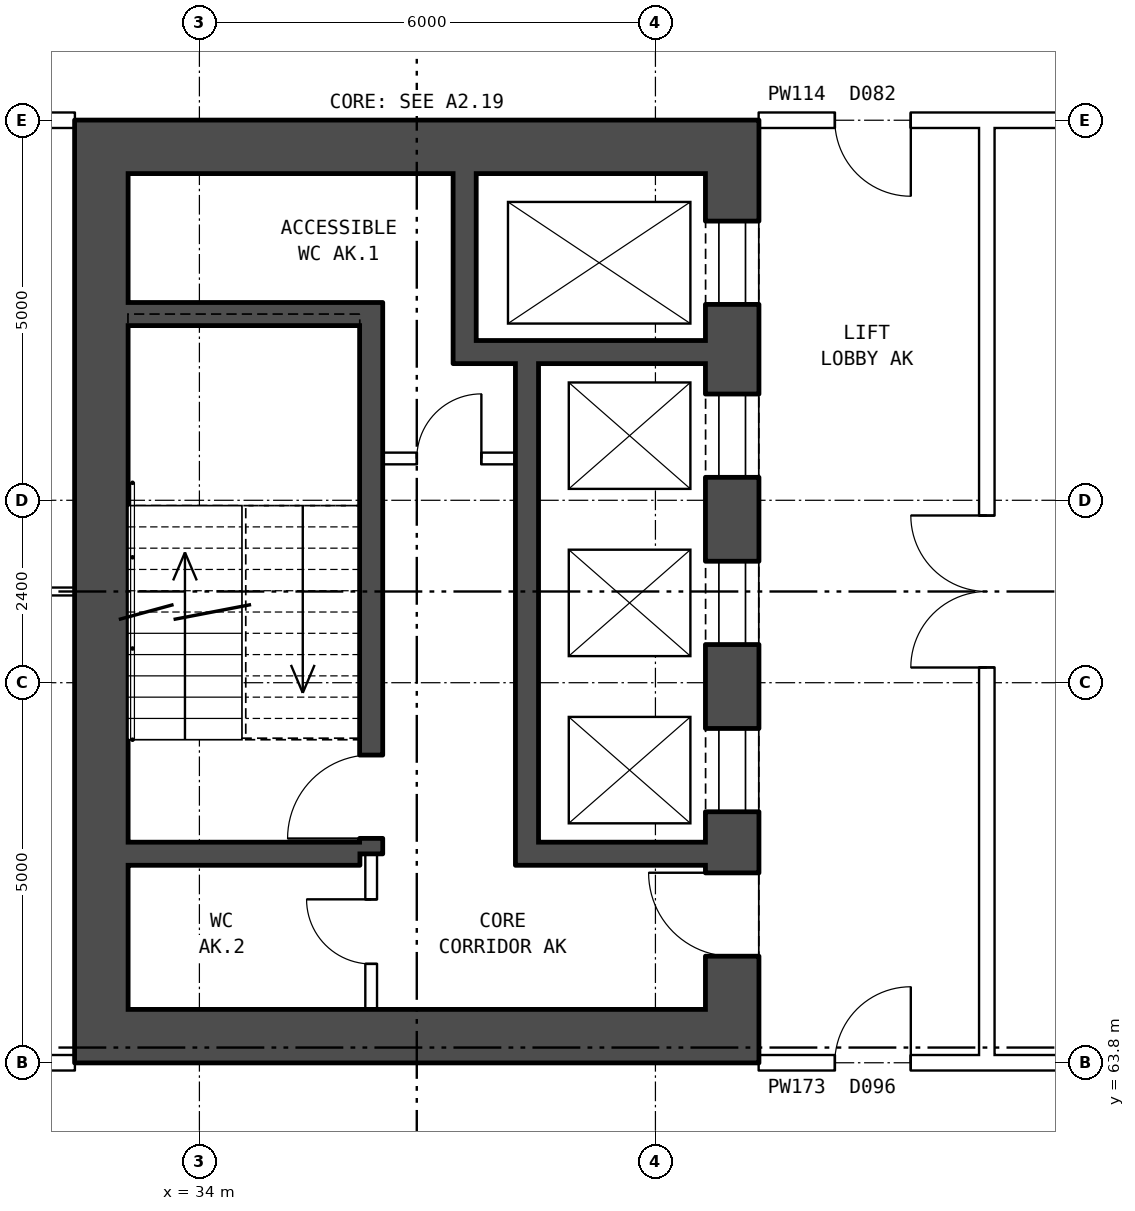
"""IFC4 building model, lengths in metres.
Left out: names, types, materials, properties, quantities, classifications, styles, units other than length and angle.
Written with IfcOpenShell. Run it as: python <this file> out.ifc"""

import sys

from ifc_helpers import new_model, si_unit, direction, frame, frame_2d, origin, place, context, subcontext, project, spatial, rectangle, extrude, element, fill, save


model = new_model("IFC4")
c1 = context("Model", 3, precision=1e-05, world=origin(), true_north=direction((0.0, 1.0)))
c2 = subcontext(c1, "Body", "Model", "MODEL_VIEW")
j1 = project(units=[si_unit("LENGTHUNIT", "METRE"), si_unit("PLANEANGLEUNIT", "RADIAN")], contexts=[c1])
p1 = place(None, origin())
s1 = spatial("IfcSite", under=j1, at=p1, CompositionType="ELEMENT")
p2 = place(p1, origin())
s2 = spatial("IfcBuilding", under=s1, at=p2, CompositionType="ELEMENT")
p3 = place(p2, frame((0.0, 0.0, 67.4)))
s3 = spatial("IfcBuildingStorey", under=s2, at=p3, CompositionType="ELEMENT", Elevation=67.4)
p4 = place(p3, frame((41.01, 75.5, 0.0), z_axis=(0.0, 0.0, 1.0), x_axis=(0.0, -1.0, 0.0)))
e1 = element("IfcWall", 1, at=p4, inside=s3, PredefinedType="SHEAR", context=c2, shape_type="SweptSolid", body=[
    extrude(rectangle(XDim=11.0, YDim=0.7, at=frame_2d((5.5, 0.0))), origin(), (0.0, 0.0, 1.0), 3.6),
])
p5 = place(p4, frame((0.625, 0.0, 0.0)))
e2 = element("IfcOpeningElement", 2, at=p5, cuts=e1, PredefinedType="OPENING", context=c2, shape_type="SweptSolid", body=[
    extrude(rectangle(XDim=1.1, YDim=2.1, at=frame_2d((0.55, 1.05))), frame((0.0, 0.36, 0.0), z_axis=(0.0, -1.0, 0.0), x_axis=(1.0, 0.0, 0.0)), (0.0, 0.0, 1.0), 0.72),
])
p6 = place(p4, frame((2.9, 0.0, 0.0)))
e3 = element("IfcOpeningElement", 3, at=p6, cuts=e1, PredefinedType="OPENING", context=c2, shape_type="SweptSolid", body=[
    extrude(rectangle(XDim=1.1, YDim=2.1, at=frame_2d((0.55, 1.05))), frame((0.0, 0.36, 0.0), z_axis=(0.0, -1.0, 0.0), x_axis=(1.0, 0.0, 0.0)), (0.0, 0.0, 1.0), 0.72),
])
p7 = place(p4, frame((5.1, 0.0, 0.0)))
e4 = element("IfcOpeningElement", 4, at=p7, cuts=e1, PredefinedType="OPENING", context=c2, shape_type="SweptSolid", body=[
    extrude(rectangle(XDim=1.1, YDim=2.1, at=frame_2d((0.55, 1.05))), frame((0.0, 0.36, 0.0), z_axis=(0.0, -1.0, 0.0), x_axis=(1.0, 0.0, 0.0)), (0.0, 0.0, 1.0), 0.72),
])
p8 = place(p4, frame((7.3, 0.0, 0.0)))
e5 = element("IfcOpeningElement", 5, at=p8, cuts=e1, PredefinedType="OPENING", context=c2, shape_type="SweptSolid", body=[
    extrude(rectangle(XDim=1.1, YDim=2.1, at=frame_2d((0.55, 1.05))), frame((0.0, 0.36, 0.0), z_axis=(0.0, -1.0, 0.0), x_axis=(1.0, 0.0, 0.0)), (0.0, 0.0, 1.0), 0.72),
])
p9 = place(p4, frame((9.2, 0.0, 0.0)))
e6 = element("IfcOpeningElement", 6, at=p9, cuts=e1, PredefinedType="OPENING", context=c2, shape_type="SweptSolid", body=[
    extrude(rectangle(XDim=1.1, YDim=2.1, at=frame_2d((0.55, 1.05))), frame((0.0, 0.36, 0.0), z_axis=(0.0, -1.0, 0.0), x_axis=(1.0, 0.0, 0.0)), (0.0, 0.0, 1.0), 0.72),
])
p10 = place(p3, frame((32.71, 75.5, 0.0), z_axis=(0.0, 0.0, 1.0), x_axis=(0.0, -1.0, 0.0)))
e7 = element("IfcWall", 7, at=p10, inside=s3, PredefinedType="SHEAR", context=c2, shape_type="SweptSolid", body=[
    extrude(rectangle(XDim=11.0, YDim=0.7, at=frame_2d((5.5, 0.0))), origin(), (0.0, 0.0, 1.0), 3.6),
])
for number, where, z_axis, x_axis in (
    (8, (41.36, 75.85, 0.0), (0.0, 0.0, 1.0), (-1.0, 0.0, 0.0)),
    (9, (41.36, 64.15, 0.0), (0.0, 0.0, 1.0), (-1.0, 0.0, 0.0)),
):
    element("IfcWall", number, at=place(p3, frame(where, z_axis=z_axis, x_axis=x_axis)), inside=s3, PredefinedType="SHEAR", context=c2, shape_type="SweptSolid", body=[
        extrude(rectangle(XDim=9.0, YDim=0.7, at=frame_2d((4.5, 0.0))), origin(), (0.0, 0.0, 1.0), 3.6),
    ])
p11 = place(p3, frame((36.11, 73.65, 0.0), z_axis=(0.0, 0.0, 1.0), x_axis=(-1.0, 0.0, 0.0)))
e10 = element("IfcWall", 10, at=p11, inside=s3, PredefinedType="SHEAR", context=c2, shape_type="SweptSolid", body=[
    extrude(rectangle(XDim=3.05, YDim=0.3, at=frame_2d((1.525, 0.0))), origin(), (0.0, 0.0, 1.0), 3.6),
])
p12 = place(p3, frame((40.66, 73.15, 0.0), z_axis=(0.0, 0.0, 1.0), x_axis=(-1.0, 0.0, 0.0)))
e11 = element("IfcWall", 11, at=p12, inside=s3, PredefinedType="SHEAR", context=c2, shape_type="SweptSolid", body=[
    extrude(rectangle(XDim=3.32, YDim=0.3, at=frame_2d((1.66, 0.0))), origin(), (0.0, 0.0, 1.0), 3.6),
])
p13 = place(p3, frame((38.16, 71.75, 0.0), z_axis=(0.0, 0.0, 1.0), x_axis=(-1.0, 0.0, 0.0)))
e12 = element("IfcWall", 12, at=p13, inside=s3, PredefinedType="PARTITIONING", context=c2, shape_type="SweptSolid", body=[
    extrude(rectangle(XDim=1.75, YDim=0.15, at=frame_2d((0.875, 0.0))), origin(), (0.0, 0.0, 1.0), 3.6),
])
p14 = place(p13, frame((0.45, 0.0, 0.0)))
e13 = element("IfcOpeningElement", 13, at=p14, cuts=e12, PredefinedType="OPENING", context=c2, shape_type="SweptSolid", body=[
    extrude(rectangle(XDim=0.85, YDim=2.1, at=frame_2d((0.425, 1.05))), frame((0.0, 0.085, 0.0), z_axis=(0.0, -1.0, 0.0), x_axis=(1.0, 0.0, 0.0)), (0.0, 0.0, 1.0), 0.17),
])
p15 = place(p3, frame((40.66, 66.55, 0.0), z_axis=(0.0, 0.0, 1.0), x_axis=(-1.0, 0.0, 0.0)))
e14 = element("IfcWall", 14, at=p15, inside=s3, PredefinedType="SHEAR", context=c2, shape_type="SweptSolid", body=[
    extrude(rectangle(XDim=2.2, YDim=0.3, at=frame_2d((1.1, 0.0))), origin(), (0.0, 0.0, 1.0), 3.6),
])
p16 = place(p3, frame((36.11, 66.55, 0.0), z_axis=(0.0, 0.0, 1.0), x_axis=(-1.0, 0.0, 0.0)))
e15 = element("IfcWall", 15, at=p16, inside=s3, PredefinedType="SHEAR", context=c2, shape_type="SweptSolid", body=[
    extrude(rectangle(XDim=3.05, YDim=0.3, at=frame_2d((1.525, 0.0))), origin(), (0.0, 0.0, 1.0), 3.6),
])
p17 = place(p3, frame((38.31, 73.0, 0.0), z_axis=(0.0, 0.0, 1.0), x_axis=(0.0, -1.0, 0.0)))
e16 = element("IfcWall", 16, at=p17, inside=s3, PredefinedType="SHEAR", context=c2, shape_type="SweptSolid", body=[
    extrude(rectangle(XDim=6.6, YDim=0.3, at=frame_2d((3.3, 0.0))), origin(), (0.0, 0.0, 1.0), 3.6),
])
p18 = place(p3, frame((37.49, 75.5, 0.0), z_axis=(0.0, 0.0, 1.0), x_axis=(0.0, -1.0, 0.0)))
e17 = element("IfcWall", 17, at=p18, inside=s3, PredefinedType="SHEAR", context=c2, shape_type="SweptSolid", body=[
    extrude(rectangle(XDim=2.2, YDim=0.3, at=frame_2d((1.1, 0.0))), origin(), (0.0, 0.0, 1.0), 3.6),
])
p19 = place(p3, frame((36.26, 73.8, 0.0), z_axis=(0.0, 0.0, 1.0), x_axis=(0.0, -1.0, 0.0)))
e18 = element("IfcWall", 18, at=p19, inside=s3, PredefinedType="SHEAR", context=c2, shape_type="SweptSolid", body=[
    extrude(rectangle(XDim=7.25, YDim=0.3, at=frame_2d((3.625, 0.0))), origin(), (0.0, 0.0, 1.0), 3.6),
])
p20 = place(p19, frame((5.95, 0.0, 0.0)))
e19 = element("IfcOpeningElement", 19, at=p20, cuts=e18, PredefinedType="OPENING", context=c2, shape_type="SweptSolid", body=[
    extrude(rectangle(XDim=1.1, YDim=2.1, at=frame_2d((0.55, 1.05))), frame((0.0, 0.16, 0.0), z_axis=(0.0, -1.0, 0.0), x_axis=(1.0, 0.0, 0.0)), (0.0, 0.0, 1.0), 0.32),
])
p21 = place(p3, frame((36.26, 66.55, 0.0), z_axis=(0.0, 0.0, 1.0), x_axis=(0.0, -1.0, 0.0)))
e20 = element("IfcWall", 20, at=p21, inside=s3, PredefinedType="PARTITIONING", context=c2, shape_type="SweptSolid", body=[
    extrude(rectangle(XDim=2.05, YDim=0.15, at=frame_2d((1.025, 0.0))), origin(), (0.0, 0.0, 1.0), 3.6),
])
p22 = place(p21, frame((0.6, 0.0, 0.0)))
e21 = element("IfcOpeningElement", 21, at=p22, cuts=e20, PredefinedType="OPENING", context=c2, shape_type="SweptSolid", body=[
    extrude(rectangle(XDim=0.85, YDim=2.1, at=frame_2d((0.425, 1.05))), frame((0.0, 0.085, 0.0), z_axis=(0.0, -1.0, 0.0), x_axis=(1.0, 0.0, 0.0)), (0.0, 0.0, 1.0), 0.17),
])
p23 = place(p3, frame((44.36, 63.9, 0.0), z_axis=(0.0, 0.0, 1.0), x_axis=(0.0, 1.0, 0.0)))
e22 = element("IfcWall", 22, at=p23, inside=s3, PredefinedType="PARTITIONING", context=c2, shape_type="SweptSolid", body=[
    extrude(rectangle(XDim=12.2, YDim=0.2, at=frame_2d((6.1, 0.0))), origin(), (0.0, 0.0, 1.0), 3.6),
])
p24 = place(p23, frame((5.1, 0.0, 0.0)))
e23 = element("IfcOpeningElement", 23, at=p24, cuts=e22, PredefinedType="OPENING", context=c2, shape_type="SweptSolid", body=[
    extrude(rectangle(XDim=2.0, YDim=2.1, at=frame_2d((1.0, 1.05))), frame((0.0, 0.11, 0.0), z_axis=(0.0, -1.0, 0.0), x_axis=(1.0, 0.0, 0.0)), (0.0, 0.0, 1.0), 0.22),
])
p25 = place(p3, frame((23.49, 63.8, 0.0), z_axis=(0.0, 0.0, 1.0), x_axis=(1.0, 0.0, 0.0)))
e24 = element("IfcWall", 24, at=p25, inside=s3, PredefinedType="PARTITIONING", context=c2, shape_type="SweptSolid", body=[
    extrude(rectangle(XDim=8.87, YDim=0.2, at=frame_2d((4.435, 0.0))), origin(), (0.0, 0.0, 1.0), 3.6),
])
p26 = place(p25, frame((3.995, 0.0, 0.0)))
e25 = element("IfcOpeningElement", 25, at=p26, cuts=e24, PredefinedType="OPENING", context=c2, shape_type="SweptSolid", body=[
    extrude(rectangle(XDim=1.0, YDim=2.1, at=frame_2d((0.5, 1.05))), frame((0.0, 0.11, 0.0), z_axis=(0.0, -1.0, 0.0), x_axis=(1.0, 0.0, 0.0)), (0.0, 0.0, 1.0), 0.22),
])
p27 = place(p3, frame((44.36, 63.8, 0.0), z_axis=(0.0, 0.0, 1.0), x_axis=(1.0, 0.0, 0.0)))
e26 = element("IfcWall", 26, at=p27, inside=s3, PredefinedType="PARTITIONING", context=c2, shape_type="SweptSolid", body=[
    extrude(rectangle(XDim=19.28, YDim=0.2, at=frame_2d((9.64, 0.0))), origin(), (0.0, 0.0, 1.0), 3.6),
])
p28 = place(p27, frame((8.74, 0.0, 0.0)))
e27 = element("IfcOpeningElement", 27, at=p28, cuts=e26, PredefinedType="OPENING", context=c2, shape_type="SweptSolid", body=[
    extrude(rectangle(XDim=1.8, YDim=2.1, at=frame_2d((0.9, 1.05))), frame((0.0, 0.11, 0.0), z_axis=(0.0, -1.0, 0.0), x_axis=(1.0, 0.0, 0.0)), (0.0, 0.0, 1.0), 0.22),
])
p29 = place(p3, frame((41.36, 63.8, 0.0), z_axis=(0.0, 0.0, 1.0), x_axis=(1.0, 0.0, 0.0)))
e28 = element("IfcWall", 28, at=p29, inside=s3, PredefinedType="PARTITIONING", context=c2, shape_type="SweptSolid", body=[
    extrude(rectangle(XDim=3.0, YDim=0.2, at=frame_2d((1.5, 0.0))), origin(), (0.0, 0.0, 1.0), 3.6),
])
p30 = place(p29, frame((1.0, 0.0, 0.0)))
e29 = element("IfcOpeningElement", 29, at=p30, cuts=e28, PredefinedType="OPENING", context=c2, shape_type="SweptSolid", body=[
    extrude(rectangle(XDim=1.0, YDim=2.1, at=frame_2d((0.5, 1.05))), frame((0.0, 0.11, 0.0), z_axis=(0.0, -1.0, 0.0), x_axis=(1.0, 0.0, 0.0)), (0.0, 0.0, 1.0), 0.22),
])
p31 = place(p3, frame((23.49, 70.0, 0.0), z_axis=(0.0, 0.0, 1.0), x_axis=(1.0, 0.0, 0.0)))
e30 = element("IfcWall", 30, at=p31, inside=s3, PredefinedType="PARTITIONING", context=c2, shape_type="SweptSolid", body=[
    extrude(rectangle(XDim=8.87, YDim=0.1, at=frame_2d((4.435, 0.0))), origin(), (0.0, 0.0, 1.0), 3.6),
])
p32 = place(p3, frame((23.49, 76.2, 0.0), z_axis=(0.0, 0.0, 1.0), x_axis=(1.0, 0.0, 0.0)))
e31 = element("IfcWall", 31, at=p32, inside=s3, PredefinedType="PARTITIONING", context=c2, shape_type="SweptSolid", body=[
    extrude(rectangle(XDim=8.87, YDim=0.2, at=frame_2d((4.435, 0.0))), origin(), (0.0, 0.0, 1.0), 3.6),
])
p33 = place(p32, frame((3.995, 0.0, 0.0)))
e32 = element("IfcOpeningElement", 32, at=p33, cuts=e31, PredefinedType="OPENING", context=c2, shape_type="SweptSolid", body=[
    extrude(rectangle(XDim=1.0, YDim=2.1, at=frame_2d((0.5, 1.05))), frame((0.0, 0.11, 0.0), z_axis=(0.0, -1.0, 0.0), x_axis=(1.0, 0.0, 0.0)), (0.0, 0.0, 1.0), 0.22),
])
p34 = place(p3, frame((44.36, 76.2, 0.0), z_axis=(0.0, 0.0, 1.0), x_axis=(1.0, 0.0, 0.0)))
e33 = element("IfcWall", 33, at=p34, inside=s3, PredefinedType="PARTITIONING", context=c2, shape_type="SweptSolid", body=[
    extrude(rectangle(XDim=19.28, YDim=0.2, at=frame_2d((9.64, 0.0))), origin(), (0.0, 0.0, 1.0), 3.6),
])
p35 = place(p34, frame((8.74, 0.0, 0.0)))
e34 = element("IfcOpeningElement", 34, at=p35, cuts=e33, PredefinedType="OPENING", context=c2, shape_type="SweptSolid", body=[
    extrude(rectangle(XDim=1.8, YDim=2.1, at=frame_2d((0.9, 1.05))), frame((0.0, 0.11, 0.0), z_axis=(0.0, -1.0, 0.0), x_axis=(1.0, 0.0, 0.0)), (0.0, 0.0, 1.0), 0.22),
])
p36 = place(p3, frame((41.36, 76.2, 0.0), z_axis=(0.0, 0.0, 1.0), x_axis=(1.0, 0.0, 0.0)))
e35 = element("IfcWall", 35, at=p36, inside=s3, PredefinedType="PARTITIONING", context=c2, shape_type="SweptSolid", body=[
    extrude(rectangle(XDim=3.0, YDim=0.2, at=frame_2d((1.5, 0.0))), origin(), (0.0, 0.0, 1.0), 3.6),
])
p37 = place(p36, frame((1.0, 0.0, 0.0)))
e36 = element("IfcOpeningElement", 36, at=p37, cuts=e35, PredefinedType="OPENING", context=c2, shape_type="SweptSolid", body=[
    extrude(rectangle(XDim=1.0, YDim=2.1, at=frame_2d((0.5, 1.05))), frame((0.0, 0.11, 0.0), z_axis=(0.0, -1.0, 0.0), x_axis=(1.0, 0.0, 0.0)), (0.0, 0.0, 1.0), 0.22),
])
p38 = place(p5, origin())
e37 = element("IfcDoor", 37, at=p38, inside=s3, OperationType="DOUBLE_DOOR_SLIDING", PredefinedType="DOOR", context=c2, shape_type="SweptSolid", body=[
    extrude(rectangle(XDim=1.1, YDim=2.1, at=frame_2d((0.55, 1.05))), frame((0.0, -0.285, 0.0), z_axis=(0.0, -1.0, 0.0), x_axis=(1.0, 0.0, 0.0)), (0.0, 0.0, 1.0), 0.05),
])
fill(e2, e37)
p39 = place(p6, origin())
e38 = element("IfcDoor", 38, at=p39, inside=s3, OperationType="DOUBLE_DOOR_SLIDING", PredefinedType="DOOR", context=c2, shape_type="SweptSolid", body=[
    extrude(rectangle(XDim=1.1, YDim=2.1, at=frame_2d((0.55, 1.05))), frame((0.0, -0.285, 0.0), z_axis=(0.0, -1.0, 0.0), x_axis=(1.0, 0.0, 0.0)), (0.0, 0.0, 1.0), 0.05),
])
fill(e3, e38)
p40 = place(p7, origin())
e39 = element("IfcDoor", 39, at=p40, inside=s3, OperationType="DOUBLE_DOOR_SLIDING", PredefinedType="DOOR", context=c2, shape_type="SweptSolid", body=[
    extrude(rectangle(XDim=1.1, YDim=2.1, at=frame_2d((0.55, 1.05))), frame((0.0, -0.285, 0.0), z_axis=(0.0, -1.0, 0.0), x_axis=(1.0, 0.0, 0.0)), (0.0, 0.0, 1.0), 0.05),
])
fill(e4, e39)
p41 = place(p8, origin())
e40 = element("IfcDoor", 40, at=p41, inside=s3, OperationType="DOUBLE_DOOR_SLIDING", PredefinedType="DOOR", context=c2, shape_type="SweptSolid", body=[
    extrude(rectangle(XDim=1.1, YDim=2.1, at=frame_2d((0.55, 1.05))), frame((0.0, -0.285, 0.0), z_axis=(0.0, -1.0, 0.0), x_axis=(1.0, 0.0, 0.0)), (0.0, 0.0, 1.0), 0.05),
])
fill(e5, e40)
p42 = place(p9, frame((1.1, 0.0, 0.0), z_axis=(0.0, 0.0, 1.0), x_axis=(-1.0, 0.0, 0.0)))
e41 = element("IfcDoor", 41, at=p42, inside=s3, OperationType="SINGLE_SWING_RIGHT", PredefinedType="DOOR", context=c2, shape_type="SweptSolid", body=[
    extrude(rectangle(XDim=1.1, YDim=2.1, at=frame_2d((0.55, 1.05))), frame((0.0, 0.335, 0.0), z_axis=(0.0, -1.0, 0.0), x_axis=(1.0, 0.0, 0.0)), (0.0, 0.0, 1.0), 0.05),
])
fill(e6, e41)
p43 = place(p20, frame((1.1, 0.0, 0.0), z_axis=(0.0, 0.0, 1.0), x_axis=(-1.0, 0.0, 0.0)))
e42 = element("IfcDoor", 42, at=p43, inside=s3, OperationType="SINGLE_SWING_LEFT", PredefinedType="DOOR", context=c2, shape_type="SweptSolid", body=[
    extrude(rectangle(XDim=1.1, YDim=2.1, at=frame_2d((0.55, 1.05))), frame((0.0, 0.025, 0.0), z_axis=(0.0, -1.0, 0.0), x_axis=(1.0, 0.0, 0.0)), (0.0, 0.0, 1.0), 0.05),
])
fill(e19, e42)
p44 = place(p14, frame((0.85, 0.0, 0.0), z_axis=(0.0, 0.0, 1.0), x_axis=(-1.0, 0.0, 0.0)))
e43 = element("IfcDoor", 43, at=p44, inside=s3, OperationType="SINGLE_SWING_RIGHT", PredefinedType="DOOR", context=c2, shape_type="SweptSolid", body=[
    extrude(rectangle(XDim=0.85, YDim=2.1, at=frame_2d((0.425, 1.05))), frame((0.0, 0.025, 0.0), z_axis=(0.0, -1.0, 0.0), x_axis=(1.0, 0.0, 0.0)), (0.0, 0.0, 1.0), 0.05),
])
fill(e13, e43)
p45 = place(p22, frame((0.85, 0.0, 0.0), z_axis=(0.0, 0.0, 1.0), x_axis=(-1.0, 0.0, 0.0)))
e44 = element("IfcDoor", 44, at=p45, inside=s3, OperationType="SINGLE_SWING_RIGHT", PredefinedType="DOOR", context=c2, shape_type="SweptSolid", body=[
    extrude(rectangle(XDim=0.85, YDim=2.1, at=frame_2d((0.425, 1.05))), frame((0.0, 0.025, 0.0), z_axis=(0.0, -1.0, 0.0), x_axis=(1.0, 0.0, 0.0)), (0.0, 0.0, 1.0), 0.05),
])
fill(e21, e44)
p46 = place(p24, origin())
e45 = element("IfcDoor", 45, at=p46, inside=s3, OperationType="DOUBLE_DOOR_SINGLE_SWING", PredefinedType="DOOR", context=c2, shape_type="SweptSolid", body=[
    extrude(rectangle(XDim=2.0, YDim=2.1, at=frame_2d((1.0, 1.05))), frame((0.0, 0.025, 0.0), z_axis=(0.0, -1.0, 0.0), x_axis=(1.0, 0.0, 0.0)), (0.0, 0.0, 1.0), 0.05),
])
fill(e23, e45)
p47 = place(p30, origin())
e46 = element("IfcDoor", 46, at=p47, inside=s3, OperationType="SINGLE_SWING_RIGHT", PredefinedType="DOOR", context=c2, shape_type="SweptSolid", body=[
    extrude(rectangle(XDim=1.0, YDim=2.1, at=frame_2d((0.5, 1.05))), frame((0.0, 0.025, 0.0), z_axis=(0.0, -1.0, 0.0), x_axis=(1.0, 0.0, 0.0)), (0.0, 0.0, 1.0), 0.05),
])
fill(e29, e46)
p48 = place(p37, frame((1.0, 0.0, 0.0), z_axis=(0.0, 0.0, 1.0), x_axis=(-1.0, 0.0, 0.0)))
e47 = element("IfcDoor", 47, at=p48, inside=s3, OperationType="SINGLE_SWING_LEFT", PredefinedType="DOOR", context=c2, shape_type="SweptSolid", body=[
    extrude(rectangle(XDim=1.0, YDim=2.1, at=frame_2d((0.5, 1.05))), frame((0.0, 0.025, 0.0), z_axis=(0.0, -1.0, 0.0), x_axis=(1.0, 0.0, 0.0)), (0.0, 0.0, 1.0), 0.05),
])
fill(e36, e47)
save(model, sys.argv[1])
